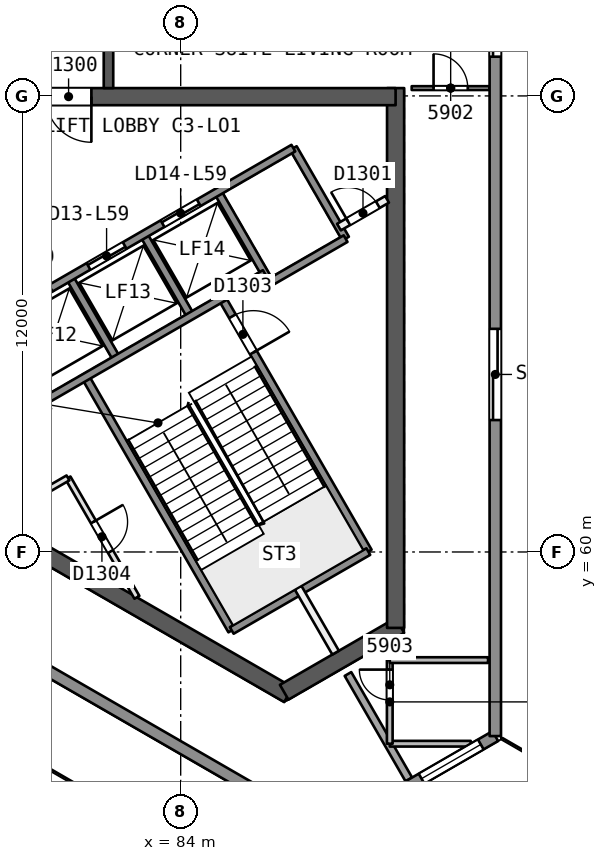
"""IFC4 building model, lengths in metres.
Left out: names, types, materials, properties, quantities, classifications, styles, units other than length and angle.
Written with IfcOpenShell. Run it as: python <this file> out.ifc"""

import sys

from ifc_helpers import new_model, si_unit, direction, frame, frame_2d, origin, place, context, subcontext, project, spatial, rectangle, extrude, element, fill, save


model = new_model("IFC4")
c1 = context("Model", 3, precision=1e-05, world=origin(), true_north=direction((0.0, 1.0)))
c2 = subcontext(c1, "Body", "Model", "MODEL_VIEW")
j1 = project(units=[si_unit("LENGTHUNIT", "METRE"), si_unit("PLANEANGLEUNIT", "RADIAN")], contexts=[c1])
p1 = place(None, origin())
s1 = spatial("IfcSite", under=j1, at=p1, CompositionType="ELEMENT")
p2 = place(p1, origin())
s2 = spatial("IfcBuilding", under=s1, at=p2, CompositionType="ELEMENT")
p3 = place(p2, frame((0.0, 0.0, 239.1)))
s3 = spatial("IfcBuildingStorey", under=s2, at=p3, CompositionType="ELEMENT", Elevation=239.1)
p4 = place(p3, frame((74.617, 63.299, 0.0), z_axis=(0.0, 0.0, 1.0), x_axis=(0.86602594008, -0.499999071108, 0.0)))
e1 = element("IfcWall", 1, at=p4, inside=s3, PredefinedType="SHEAR", context=c2, shape_type="SweptSolid", body=[
    extrude(rectangle(XDim=14.108, YDim=0.45, at=frame_2d((7.054, 0.0))), origin(), (0.0, 0.0, 1.0), 3.7),
])
p5 = place(p3, frame((86.723, 56.31, 0.0), z_axis=(0.0, 0.0, 1.0), x_axis=(0.866042179588, 0.49997094233, 0.0)))
e2 = element("IfcWall", 2, at=p5, inside=s3, PredefinedType="SHEAR", context=c2, shape_type="SweptSolid", body=[
    extrude(rectangle(XDim=3.515, YDim=0.45, at=frame_2d((1.758, 0.0))), origin(), (0.0, 0.0, 1.0), 3.7),
])
p6 = place(p3, frame((89.655, 58.002, 0.0), z_axis=(0.0, 0.0, 1.0), x_axis=(0.0, 1.0, 0.0)))
e3 = element("IfcWall", 3, at=p6, inside=s3, PredefinedType="SHEAR", context=c2, shape_type="SweptSolid", body=[
    extrude(rectangle(XDim=14.204, YDim=0.45, at=frame_2d((7.102, 0.0))), origin(), (0.0, 0.0, 1.0), 3.7),
])
p7 = place(p3, frame((89.655, 71.981, 0.0), z_axis=(0.0, 0.0, 1.0), x_axis=(-1.0, 0.0, 0.0)))
e4 = element("IfcWall", 4, at=p7, inside=s3, PredefinedType="SHEAR", context=c2, shape_type="SweptSolid", body=[
    extrude(rectangle(XDim=10.155, YDim=0.45, at=frame_2d((5.078, 0.0))), origin(), (0.0, 0.0, 1.0), 3.7),
])
p8 = place(p7, frame((8.005, 0.0, 0.0)))
e5 = element("IfcOpeningElement", 5, at=p8, cuts=e4, PredefinedType="OPENING", context=c2, shape_type="SweptSolid", body=[
    extrude(rectangle(XDim=1.2, YDim=2.1, at=frame_2d((0.6, 1.05))), frame((0.0, 0.235, 0.0), z_axis=(0.0, -1.0, 0.0), x_axis=(1.0, 0.0, 0.0)), (0.0, 0.0, 1.0), 0.471),
])
p9 = place(p3, frame((82.1, 72.206, 0.0), z_axis=(0.0, 0.0, 1.0), x_axis=(0.0, 1.0, 0.0)))
e6 = element("IfcWall", 6, at=p9, inside=s3, PredefinedType="SHEAR", context=c2, shape_type="SweptSolid", body=[
    extrude(rectangle(XDim=15.588, YDim=0.25, at=frame_2d((7.794, 0.0))), origin(), (0.0, 0.0, 1.0), 3.3),
])
p10 = place(p9, frame((1.527, 0.0, 0.0)))
e7 = element("IfcOpeningElement", 7, at=p10, cuts=e6, PredefinedType="OPENING", context=c2, shape_type="SweptSolid", body=[
    extrude(rectangle(XDim=1.0, YDim=2.1, at=frame_2d((0.5, 1.05))), frame((0.0, 0.135, 0.0), z_axis=(0.0, -1.0, 0.0), x_axis=(1.0, 0.0, 0.0)), (0.0, 0.0, 1.0), 0.271),
])
p11 = place(p9, frame((5.396, 0.0, 0.0)))
e8 = element("IfcOpeningElement", 8, at=p11, cuts=e6, PredefinedType="OPENING", context=c2, shape_type="SweptSolid", body=[
    extrude(rectangle(XDim=0.9, YDim=2.1, at=frame_2d((0.45, 1.05))), frame((0.0, 0.135, 0.0), z_axis=(0.0, -1.0, 0.0), x_axis=(1.0, 0.0, 0.0)), (0.0, 0.0, 1.0), 0.271),
])
p12 = place(p9, frame((8.981, 0.0, 0.0)))
e9 = element("IfcOpeningElement", 9, at=p12, cuts=e6, PredefinedType="OPENING", context=c2, shape_type="SweptSolid", body=[
    extrude(rectangle(XDim=0.9, YDim=2.1, at=frame_2d((0.45, 1.05))), frame((0.0, 0.135, 0.0), z_axis=(0.0, -1.0, 0.0), x_axis=(1.0, 0.0, 0.0)), (0.0, 0.0, 1.0), 0.271),
])
p13 = place(p9, frame((12.906, 0.0, 0.0)))
e10 = element("IfcOpeningElement", 10, at=p13, cuts=e6, PredefinedType="OPENING", context=c2, shape_type="SweptSolid", body=[
    extrude(rectangle(XDim=1.0, YDim=2.1, at=frame_2d((0.5, 1.05))), frame((0.0, 0.135, 0.0), z_axis=(0.0, -1.0, 0.0), x_axis=(1.0, 0.0, 0.0)), (0.0, 0.0, 1.0), 0.271),
])
p14 = place(p3, frame((90.079, 72.206, 0.0), z_axis=(0.0, 0.0, 1.0), x_axis=(1.0, 0.0, 0.0)))
e11 = element("IfcWall", 11, at=p14, inside=s3, PredefinedType="PARTITIONING", context=c2, shape_type="SweptSolid", body=[
    extrude(rectangle(XDim=2.05, YDim=0.1, at=frame_2d((1.025, 0.0))), origin(), (0.0, 0.0, 1.0), 3.3),
])
p15 = place(p14, frame((0.575, 0.0, 0.0)))
e12 = element("IfcOpeningElement", 12, at=p15, cuts=e11, PredefinedType="OPENING", context=c2, shape_type="SweptSolid", body=[
    extrude(rectangle(XDim=0.9, YDim=2.1, at=frame_2d((0.45, 1.05))), frame((0.0, 0.061, 0.0), z_axis=(0.0, -1.0, 0.0), x_axis=(1.0, 0.0, 0.0)), (0.0, 0.0, 1.0), 0.121),
])
p16 = place(p3, frame((91.633, 54.955, 0.0), z_axis=(0.0, 0.0, 1.0), x_axis=(-1.0, 0.0, 0.0)))
e13 = element("IfcWall", 13, at=p16, inside=s3, PredefinedType="PARTITIONING", context=c2, shape_type="SweptSolid", body=[
    extrude(rectangle(XDim=2.132, YDim=0.15, at=frame_2d((1.066, 0.0))), origin(), (0.0, 0.0, 1.0), 3.3),
])
p17 = place(p3, frame((89.501, 54.955, 0.0), z_axis=(0.0, 0.0, 1.0), x_axis=(0.0, 1.0, 0.0)))
e14 = element("IfcWall", 14, at=p17, inside=s3, PredefinedType="PARTITIONING", context=c2, shape_type="SweptSolid", body=[
    extrude(rectangle(XDim=2.2, YDim=0.15, at=frame_2d((1.1, 0.0))), origin(), (0.0, 0.0, 1.0), 3.3),
])
p18 = place(p17, frame((1.15, 0.0, 0.0)))
e15 = element("IfcOpeningElement", 15, at=p18, cuts=e14, PredefinedType="OPENING", context=c2, shape_type="SweptSolid", body=[
    extrude(rectangle(XDim=0.8, YDim=2.1, at=frame_2d((0.4, 1.05))), frame((0.0, 0.085, 0.0), z_axis=(0.0, -1.0, 0.0), x_axis=(1.0, 0.0, 0.0)), (0.0, 0.0, 1.0), 0.171),
])
p19 = place(p3, frame((89.501, 57.155, 0.0), z_axis=(0.0, 0.0, 1.0), x_axis=(1.0, 0.0, 0.0)))
e16 = element("IfcWall", 16, at=p19, inside=s3, PredefinedType="PARTITIONING", context=c2, shape_type="SweptSolid", body=[
    extrude(rectangle(XDim=2.587, YDim=0.15, at=frame_2d((1.293, 0.0))), origin(), (0.0, 0.0, 1.0), 3.3),
])
p20 = place(p3, frame((88.402, 56.789, 0.0), z_axis=(0.0, 0.0, 1.0), x_axis=(0.500023670775, -0.866011737025, 0.0)))
e17 = element("IfcWall", 17, at=p20, inside=s3, PredefinedType="PARTITIONING", context=c2, shape_type="SweptSolid", body=[
    extrude(rectangle(XDim=3.204, YDim=0.2, at=frame_2d((1.602, 0.0))), origin(), (0.0, 0.0, 1.0), 3.3),
])
p21 = place(p3, frame((92.279, 55.156, 0.0), z_axis=(0.0, 0.0, 1.0), x_axis=(-0.866029619509, -0.49999269808, 0.0)))
e18 = element("IfcWall", 18, at=p21, inside=s3, PredefinedType="SOLIDWALL", context=c2, shape_type="SweptSolid", body=[
    extrude(rectangle(XDim=5.083, YDim=0.3, at=frame_2d((2.542, 0.0))), origin(), (0.0, 0.0, 1.0), 3.3),
])
p22 = place(p21, frame((0.441, 0.0, 0.9)))
e19 = element("IfcOpeningElement", 19, at=p22, cuts=e18, PredefinedType="OPENING", context=c2, shape_type="SweptSolid", body=[
    extrude(rectangle(XDim=1.8, YDim=1.5, at=frame_2d((0.9, 0.75))), frame((0.0, 0.161, 0.0), z_axis=(0.0, -1.0, 0.0), x_axis=(1.0, 0.0, 0.0)), (0.0, 0.0, 1.0), 0.321),
])
p23 = place(p21, frame((2.955, 0.0, 0.9)))
e20 = element("IfcOpeningElement", 20, at=p23, cuts=e18, PredefinedType="OPENING", context=c2, shape_type="SweptSolid", body=[
    extrude(rectangle(XDim=1.8, YDim=1.5, at=frame_2d((0.9, 0.75))), frame((0.0, 0.161, 0.0), z_axis=(0.0, -1.0, 0.0), x_axis=(1.0, 0.0, 0.0)), (0.0, 0.0, 1.0), 0.321),
])
p24 = place(p3, frame((92.279, 104.844, 0.0), z_axis=(0.0, 0.0, 1.0), x_axis=(0.0, -1.0, 0.0)))
e21 = element("IfcWall", 21, at=p24, inside=s3, PredefinedType="SOLIDWALL", context=c2, shape_type="SweptSolid", body=[
    extrude(rectangle(XDim=49.688, YDim=0.3, at=frame_2d((24.844, 0.0))), origin(), (0.0, 0.0, 1.0), 3.3),
])
p25 = place(p24, frame((29.412, 0.0, 0.0)))
e22 = element("IfcOpeningElement", 22, at=p25, cuts=e21, PredefinedType="OPENING", context=c2, shape_type="SweptSolid", body=[
    extrude(rectangle(XDim=2.4, YDim=2.4, at=frame_2d((1.2, 1.2))), frame((0.0, 0.161, 0.0), z_axis=(0.0, -1.0, 0.0), x_axis=(1.0, 0.0, 0.0)), (0.0, 0.0, 1.0), 0.321),
])
p26 = place(p24, frame((38.973, 0.0, 0.0)))
e23 = element("IfcOpeningElement", 23, at=p26, cuts=e21, PredefinedType="OPENING", context=c2, shape_type="SweptSolid", body=[
    extrude(rectangle(XDim=2.4, YDim=2.4, at=frame_2d((1.2, 1.2))), frame((0.0, 0.161, 0.0), z_axis=(0.0, -1.0, 0.0), x_axis=(1.0, 0.0, 0.0)), (0.0, 0.0, 1.0), 0.321),
])
p27 = place(p24, frame((18.032, 0.0, 0.0)))
e24 = element("IfcOpeningElement", 24, at=p27, cuts=e21, PredefinedType="OPENING", context=c2, shape_type="SweptSolid", body=[
    extrude(rectangle(XDim=2.4, YDim=2.4, at=frame_2d((1.2, 1.2))), frame((0.0, 0.161, 0.0), z_axis=(0.0, -1.0, 0.0), x_axis=(1.0, 0.0, 0.0)), (0.0, 0.0, 1.0), 0.321),
])
p28 = place(p24, frame((8.341, 0.0, 0.0)))
e25 = element("IfcOpeningElement", 25, at=p28, cuts=e21, PredefinedType="OPENING", context=c2, shape_type="SweptSolid", body=[
    extrude(rectangle(XDim=2.4, YDim=2.4, at=frame_2d((1.2, 1.2))), frame((0.0, 0.161, 0.0), z_axis=(0.0, -1.0, 0.0), x_axis=(1.0, 0.0, 0.0)), (0.0, 0.0, 1.0), 0.321),
])
p29 = place(p24, frame((25.893, 0.0, 0.9)))
e26 = element("IfcOpeningElement", 26, at=p29, cuts=e21, PredefinedType="OPENING", context=c2, shape_type="SweptSolid", body=[
    extrude(rectangle(XDim=1.8, YDim=1.5, at=frame_2d((0.9, 0.75))), frame((0.0, 0.161, 0.0), z_axis=(0.0, -1.0, 0.0), x_axis=(1.0, 0.0, 0.0)), (0.0, 0.0, 1.0), 0.321),
])
p30 = place(p24, frame((22.307, 0.0, 0.9)))
e27 = element("IfcOpeningElement", 27, at=p30, cuts=e21, PredefinedType="OPENING", context=c2, shape_type="SweptSolid", body=[
    extrude(rectangle(XDim=1.8, YDim=1.5, at=frame_2d((0.9, 0.75))), frame((0.0, 0.161, 0.0), z_axis=(0.0, -1.0, 0.0), x_axis=(1.0, 0.0, 0.0)), (0.0, 0.0, 1.0), 0.321),
])
p31 = place(p3, frame((87.876, 52.614, 0.0), z_axis=(0.0, 0.0, 1.0), x_axis=(-0.866025459945, 0.499999902727, 0.0)))
e28 = element("IfcWall", 28, at=p31, inside=s3, PredefinedType="SOLIDWALL", context=c2, shape_type="SweptSolid", body=[
    extrude(rectangle(XDim=49.688, YDim=0.3, at=frame_2d((24.844, 0.0))), origin(), (0.0, 0.0, 1.0), 3.3),
])
p32 = place(p31, frame((23.956, 0.0, 0.0)))
e29 = element("IfcOpeningElement", 29, at=p32, cuts=e28, PredefinedType="OPENING", context=c2, shape_type="SweptSolid", body=[
    extrude(rectangle(XDim=2.4, YDim=2.4, at=frame_2d((1.2, 1.2))), frame((0.0, 0.161, 0.0), z_axis=(0.0, -1.0, 0.0), x_axis=(1.0, 0.0, 0.0)), (0.0, 0.0, 1.0), 0.321),
])
p33 = place(p31, frame((37.357, 0.0, 0.0)))
e30 = element("IfcOpeningElement", 30, at=p33, cuts=e28, PredefinedType="OPENING", context=c2, shape_type="SweptSolid", body=[
    extrude(rectangle(XDim=2.4, YDim=2.4, at=frame_2d((1.2, 1.2))), frame((0.0, 0.161, 0.0), z_axis=(0.0, -1.0, 0.0), x_axis=(1.0, 0.0, 0.0)), (0.0, 0.0, 1.0), 0.321),
])
p34 = place(p31, frame((10.243, 0.0, 0.0)))
e31 = element("IfcOpeningElement", 31, at=p34, cuts=e28, PredefinedType="OPENING", context=c2, shape_type="SweptSolid", body=[
    extrude(rectangle(XDim=2.4, YDim=2.4, at=frame_2d((1.2, 1.2))), frame((0.0, 0.161, 0.0), z_axis=(0.0, -1.0, 0.0), x_axis=(1.0, 0.0, 0.0)), (0.0, 0.0, 1.0), 0.321),
])
p35 = place(p3, frame((81.034, 61.949, 0.0), z_axis=(0.0, 0.0, 1.0), x_axis=(0.499945732631, -0.866056732798, 0.0)))
e32 = element("IfcWall", 32, at=p35, inside=s3, PredefinedType="PARTITIONING", context=c2, shape_type="SweptSolid", body=[
    extrude(rectangle(XDim=3.628, YDim=0.15, at=frame_2d((1.814, 0.0))), origin(), (0.0, 0.0, 1.0), 3.3),
])
p36 = place(p35, frame((1.337, 0.0, 0.0)))
e33 = element("IfcOpeningElement", 33, at=p36, cuts=e32, PredefinedType="OPENING", context=c2, shape_type="SweptSolid", body=[
    extrude(rectangle(XDim=0.9, YDim=2.1, at=frame_2d((0.45, 1.05))), frame((0.0, 0.085, 0.0), z_axis=(0.0, -1.0, 0.0), x_axis=(1.0, 0.0, 0.0)), (0.0, 0.0, 1.0), 0.171),
])
p37 = place(p3, frame((81.493, 64.604, 0.0), z_axis=(0.0, 0.0, 1.0), x_axis=(0.500006057782, -0.866021906294, 0.0)))
e34 = element("IfcWall", 34, at=p37, inside=s3, PredefinedType="SOLIDWALL", context=c2, shape_type="SweptSolid", body=[
    extrude(rectangle(XDim=7.7, YDim=0.2, at=frame_2d((3.85, 0.0))), origin(), (0.0, 0.0, 1.0), 3.3),
])
p38 = place(p3, frame((81.076, 67.227, 0.0), z_axis=(0.0, 0.0, 1.0), x_axis=(0.50000366821, -0.866023285932, 0.0)))
e35 = element("IfcWall", 35, at=p38, inside=s3, PredefinedType="SOLIDWALL", context=c2, shape_type="SweptSolid", body=[
    extrude(rectangle(XDim=2.48, YDim=0.2, at=frame_2d((1.24, 0.0))), origin(), (0.0, 0.0, 1.0), 3.3),
])
p39 = place(p3, frame((87.09, 59.06, 0.0), z_axis=(0.0, 0.0, 1.0), x_axis=(0.500011643316, -0.866018681408, 0.0)))
e36 = element("IfcWall", 36, at=p39, inside=s3, PredefinedType="PARTITIONING", context=c2, shape_type="SweptSolid", body=[
    extrude(rectangle(XDim=1.973, YDim=0.2, at=frame_2d((0.987, 0.0))), origin(), (0.0, 0.0, 1.0), 3.3),
])
p40 = place(p3, frame((83.024, 68.352, 0.0), z_axis=(0.0, 0.0, 1.0), x_axis=(0.50000366821, -0.866023285932, 0.0)))
e37 = element("IfcWall", 37, at=p40, inside=s3, PredefinedType="SOLIDWALL", context=c2, shape_type="SweptSolid", body=[
    extrude(rectangle(XDim=2.48, YDim=0.2, at=frame_2d((1.24, 0.0))), origin(), (0.0, 0.0, 1.0), 3.3),
])
p41 = place(p3, frame((85.087, 66.679, 0.0), z_axis=(0.0, 0.0, 1.0), x_axis=(0.500019787375, -0.866013979237, 0.0)))
e38 = element("IfcWall", 38, at=p41, inside=s3, PredefinedType="SOLIDWALL", context=c2, shape_type="SweptSolid", body=[
    extrude(rectangle(XDim=7.7, YDim=0.2, at=frame_2d((3.85, 0.0))), origin(), (0.0, 0.0, 1.0), 3.3),
])
p42 = place(p41, frame((0.55, 0.0, 0.0)))
e39 = element("IfcOpeningElement", 39, at=p42, cuts=e38, PredefinedType="OPENING", context=c2, shape_type="SweptSolid", body=[
    extrude(rectangle(XDim=1.1, YDim=2.1, at=frame_2d((0.55, 1.05))), frame((0.0, 0.11, 0.0), z_axis=(0.0, -1.0, 0.0), x_axis=(1.0, 0.0, 0.0)), (0.0, 0.0, 1.0), 0.221),
])
for number, where, z_axis, x_axis in (
    (40, (84.973, 69.477, 0.0), (0.0, 0.0, 1.0), (0.5, -0.866, 0.0)),
    (41, (86.965, 70.626, 0.0), (0.0, 0.0, 1.0), (0.5, -0.866, 0.0)),
):
    element("IfcWall", number, at=place(p3, frame(where, z_axis=z_axis, x_axis=x_axis)), inside=s3, PredefinedType="SOLIDWALL", context=c2, shape_type="SweptSolid", body=[
        extrude(rectangle(XDim=2.75, YDim=0.2, at=frame_2d((1.375, 0.0))), origin(), (0.0, 0.0, 1.0), 3.3),
    ])
p43 = place(p3, frame((77.135, 64.952, 0.0), z_axis=(0.0, 0.0, 1.0), x_axis=(0.866031916153, 0.499988720078, 0.0)))
e42 = element("IfcWall", 42, at=p43, inside=s3, PredefinedType="SOLIDWALL", context=c2, shape_type="SweptSolid", body=[
    extrude(rectangle(XDim=11.35, YDim=0.2, at=frame_2d((5.675, 0.0))), origin(), (0.0, 0.0, 1.0), 3.3),
])
p44 = place(p43, frame((2.875, 0.0, 0.0)))
e43 = element("IfcOpeningElement", 43, at=p44, cuts=e42, PredefinedType="OPENING", context=c2, shape_type="SweptSolid", body=[
    extrude(rectangle(XDim=1.1, YDim=2.1, at=frame_2d((0.55, 1.05))), frame((0.0, 0.11, 0.0), z_axis=(0.0, -1.0, 0.0), x_axis=(1.0, 0.0, 0.0)), (0.0, 0.0, 1.0), 0.221),
])
p45 = place(p43, frame((5.125, 0.0, 0.0)))
e44 = element("IfcOpeningElement", 44, at=p45, cuts=e42, PredefinedType="OPENING", context=c2, shape_type="SweptSolid", body=[
    extrude(rectangle(XDim=1.1, YDim=2.1, at=frame_2d((0.55, 1.05))), frame((0.0, 0.11, 0.0), z_axis=(0.0, -1.0, 0.0), x_axis=(1.0, 0.0, 0.0)), (0.0, 0.0, 1.0), 0.221),
])
p46 = place(p43, frame((7.375, 0.0, 0.0)))
e45 = element("IfcOpeningElement", 45, at=p46, cuts=e42, PredefinedType="OPENING", context=c2, shape_type="SweptSolid", body=[
    extrude(rectangle(XDim=1.1, YDim=2.1, at=frame_2d((0.55, 1.05))), frame((0.0, 0.11, 0.0), z_axis=(0.0, -1.0, 0.0), x_axis=(1.0, 0.0, 0.0)), (0.0, 0.0, 1.0), 0.221),
])
p47 = place(p3, frame((88.165, 68.548, 0.0), z_axis=(0.0, 0.0, 1.0), x_axis=(0.866013036001, 0.500021421018, 0.0)))
e46 = element("IfcWall", 46, at=p47, inside=s3, PredefinedType="PARTITIONING", context=c2, shape_type="SweptSolid", body=[
    extrude(rectangle(XDim=1.461, YDim=0.2, at=frame_2d((0.73, 0.0))), origin(), (0.0, 0.0, 1.0), 3.3),
])
p48 = place(p47, frame((0.281, 0.0, 0.0)))
e47 = element("IfcOpeningElement", 47, at=p48, cuts=e46, PredefinedType="OPENING", context=c2, shape_type="SweptSolid", body=[
    extrude(rectangle(XDim=0.9, YDim=2.1, at=frame_2d((0.45, 1.05))), frame((0.0, 0.11, 0.0), z_axis=(0.0, -1.0, 0.0), x_axis=(1.0, 0.0, 0.0)), (0.0, 0.0, 1.0), 0.221),
])
p49 = place(p3, frame((80.367, 63.954, 0.0), z_axis=(0.0, 0.0, 1.0), x_axis=(0.866026575979, 0.499997969693, 0.0)))
e48 = element("IfcWall", 48, at=p49, inside=s3, PredefinedType="SOLIDWALL", context=c2, shape_type="SweptSolid", body=[
    extrude(rectangle(XDim=6.75, YDim=0.2, at=frame_2d((3.375, 0.0))), origin(), (0.0, 0.0, 1.0), 3.3),
])
p50 = place(p3, frame((86.348, 67.095, 0.0), z_axis=(0.0, 0.0, 1.0), x_axis=(0.86602648383, 0.499998129301, 0.0)))
e49 = element("IfcWall", 49, at=p50, inside=s3, PredefinedType="SOLIDWALL", context=c2, shape_type="SweptSolid", body=[
    extrude(rectangle(XDim=2.3, YDim=0.2, at=frame_2d((1.15, 0.0))), origin(), (0.0, 0.0, 1.0), 3.3),
])
p51 = place(p3, frame((79.22, 60.901, 0.0), z_axis=(0.0, 0.0, 1.0), x_axis=(0.866040030748, 0.499974664501, 0.0)))
e50 = element("IfcWall", 50, at=p51, inside=s3, PredefinedType="PARTITIONING", context=c2, shape_type="SweptSolid", body=[
    extrude(rectangle(XDim=2.095, YDim=0.15, at=frame_2d((1.047, 0.0))), origin(), (0.0, 0.0, 1.0), 3.3),
])
p52 = place(p3, frame((85.343, 57.935, 0.0), z_axis=(0.0, 0.0, 1.0), x_axis=(0.866004344652, 0.500036473714, 0.0)))
e51 = element("IfcWall", 51, at=p52, inside=s3, PredefinedType="SOLIDWALL", context=c2, shape_type="SweptSolid", body=[
    extrude(rectangle(XDim=4.15, YDim=0.2, at=frame_2d((2.075, 0.0))), origin(), (0.0, 0.0, 1.0), 3.3),
])
p53 = place(p15, origin())
e52 = element("IfcDoor", 52, at=p53, inside=s3, OperationType="SINGLE_SWING_LEFT", PredefinedType="NOTDEFINED", context=c2, shape_type="SweptSolid", body=[
    extrude(rectangle(XDim=0.9, YDim=2.1, at=frame_2d((0.45, 1.05))), frame((0.0, 0.025, 0.0), z_axis=(0.0, -1.0, 0.0), x_axis=(1.0, 0.0, 0.0)), (0.0, 0.0, 1.0), 0.05),
])
fill(e12, e52)
p54 = place(p18, origin())
e53 = element("IfcDoor", 53, at=p54, inside=s3, OperationType="SINGLE_SWING_RIGHT", PredefinedType="NOTDEFINED", context=c2, shape_type="SweptSolid", body=[
    extrude(rectangle(XDim=0.8, YDim=2.1, at=frame_2d((0.4, 1.05))), frame((0.0, 0.025, 0.0), z_axis=(0.0, -1.0, 0.0), x_axis=(1.0, 0.0, 0.0)), (0.0, 0.0, 1.0), 0.05),
])
fill(e15, e53)
p55 = place(p22, origin())
e54 = element("IfcWindow", 54, at=p55, inside=s3, PartitioningType="SINGLE_PANEL", PredefinedType="WINDOW", context=c2, shape_type="SweptSolid", body=[
    extrude(rectangle(XDim=1.8, YDim=1.5, at=frame_2d((0.9, 0.75))), frame((0.0, 0.03, 0.0), z_axis=(0.0, -1.0, 0.0), x_axis=(1.0, 0.0, 0.0)), (0.0, 0.0, 1.0), 0.06),
])
fill(e19, e54)
p56 = place(p25, origin())
e55 = element("IfcDoor", 55, at=p56, inside=s3, OperationType="SLIDING_TO_LEFT", PredefinedType="NOTDEFINED", context=c2, shape_type="SweptSolid", body=[
    extrude(rectangle(XDim=2.4, YDim=2.4, at=frame_2d((1.2, 1.2))), frame((0.0, 0.025, 0.0), z_axis=(0.0, -1.0, 0.0), x_axis=(1.0, 0.0, 0.0)), (0.0, 0.0, 1.0), 0.05),
])
fill(e22, e55)
p57 = place(p26, origin())
e56 = element("IfcDoor", 56, at=p57, inside=s3, OperationType="SLIDING_TO_RIGHT", PredefinedType="NOTDEFINED", context=c2, shape_type="SweptSolid", body=[
    extrude(rectangle(XDim=2.4, YDim=2.4, at=frame_2d((1.2, 1.2))), frame((0.0, 0.025, 0.0), z_axis=(0.0, -1.0, 0.0), x_axis=(1.0, 0.0, 0.0)), (0.0, 0.0, 1.0), 0.05),
])
fill(e23, e56)
p58 = place(p8, origin())
e57 = element("IfcDoor", 57, at=p58, inside=s3, OperationType="SINGLE_SWING_LEFT", PredefinedType="NOTDEFINED", context=c2, shape_type="SweptSolid", body=[
    extrude(rectangle(XDim=1.2, YDim=2.1, at=frame_2d((0.6, 1.05))), frame((0.0, 0.025, 0.0), z_axis=(0.0, -1.0, 0.0), x_axis=(1.0, 0.0, 0.0)), (0.0, 0.0, 1.0), 0.05),
])
fill(e5, e57)
p59 = place(p45, origin())
e58 = element("IfcDoor", 58, at=p59, inside=s3, OperationType="SLIDING_TO_RIGHT", PredefinedType="NOTDEFINED", context=c2, shape_type="SweptSolid", body=[
    extrude(rectangle(XDim=1.1, YDim=2.1, at=frame_2d((0.55, 1.05))), frame((0.0, 0.025, 0.0), z_axis=(0.0, -1.0, 0.0), x_axis=(1.0, 0.0, 0.0)), (0.0, 0.0, 1.0), 0.05),
])
fill(e44, e58)
p60 = place(p46, origin())
e59 = element("IfcDoor", 59, at=p60, inside=s3, OperationType="SLIDING_TO_LEFT", PredefinedType="NOTDEFINED", context=c2, shape_type="SweptSolid", body=[
    extrude(rectangle(XDim=1.1, YDim=2.1, at=frame_2d((0.55, 1.05))), frame((0.0, 0.025, 0.0), z_axis=(0.0, -1.0, 0.0), x_axis=(1.0, 0.0, 0.0)), (0.0, 0.0, 1.0), 0.05),
])
fill(e45, e59)
p61 = place(p48, origin())
e60 = element("IfcDoor", 60, at=p61, inside=s3, OperationType="SINGLE_SWING_LEFT", PredefinedType="NOTDEFINED", context=c2, shape_type="SweptSolid", body=[
    extrude(rectangle(XDim=0.9, YDim=2.1, at=frame_2d((0.45, 1.05))), frame((0.0, 0.025, 0.0), z_axis=(0.0, -1.0, 0.0), x_axis=(1.0, 0.0, 0.0)), (0.0, 0.0, 1.0), 0.05),
])
fill(e47, e60)
p62 = place(p42, origin())
e61 = element("IfcDoor", 61, at=p62, inside=s3, OperationType="SINGLE_SWING_RIGHT", PredefinedType="NOTDEFINED", context=c2, shape_type="SweptSolid", body=[
    extrude(rectangle(XDim=1.1, YDim=2.1, at=frame_2d((0.55, 1.05))), frame((0.0, 0.025, 0.0), z_axis=(0.0, -1.0, 0.0), x_axis=(1.0, 0.0, 0.0)), (0.0, 0.0, 1.0), 0.05),
])
fill(e39, e61)
p63 = place(p36, origin())
e62 = element("IfcDoor", 62, at=p63, inside=s3, OperationType="SINGLE_SWING_LEFT", PredefinedType="NOTDEFINED", context=c2, shape_type="SweptSolid", body=[
    extrude(rectangle(XDim=0.9, YDim=2.1, at=frame_2d((0.45, 1.05))), frame((0.0, 0.025, 0.0), z_axis=(0.0, -1.0, 0.0), x_axis=(1.0, 0.0, 0.0)), (0.0, 0.0, 1.0), 0.05),
])
fill(e33, e62)
save(model, sys.argv[1])
